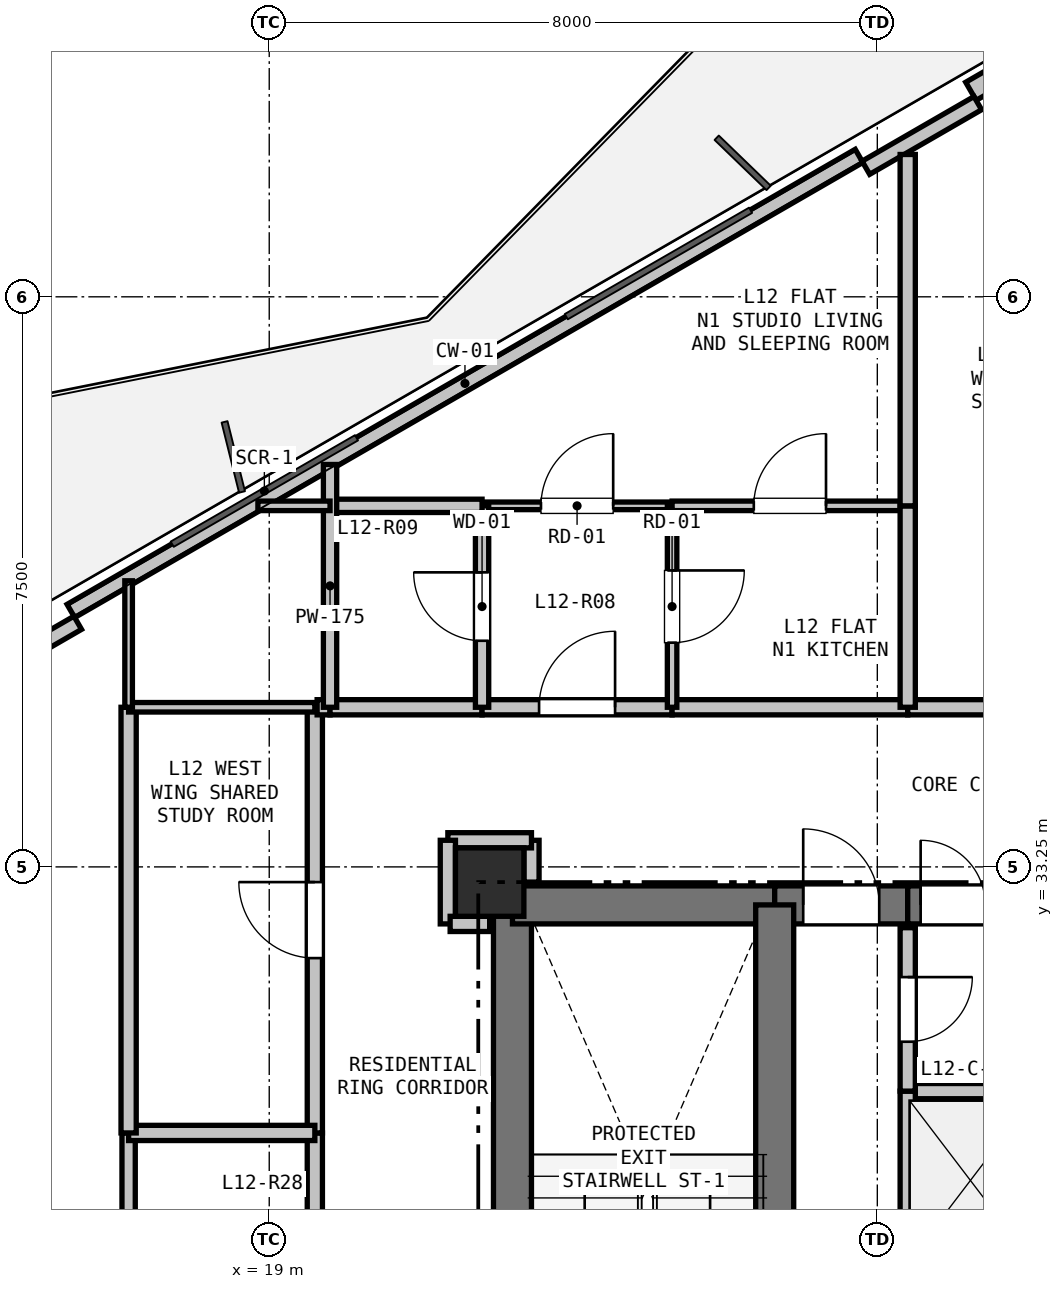
"""IFC4 building model, lengths in metres.
Left out: names, types, materials, properties, quantities, classifications, styles, units other than length and angle.
Written with IfcOpenShell. Run it as: python <this file> out.ifc"""

import sys

from ifc_helpers import new_model, si_unit, direction, frame, frame_2d, origin, origin_2d, place, context, subcontext, project, spatial, rectangle, extrude, element, fill, save


model = new_model("IFC4")
c1 = context("Model", 3, precision=1e-05, world=origin(), true_north=direction((0.0, 1.0)))
c2 = subcontext(c1, "Body", "Model", "MODEL_VIEW")
j1 = project(units=[si_unit("LENGTHUNIT", "METRE"), si_unit("PLANEANGLEUNIT", "RADIAN")], contexts=[c1])
p1 = place(None, origin())
s1 = spatial("IfcSite", under=j1, at=p1, CompositionType="ELEMENT")
p2 = place(p1, origin())
s2 = spatial("IfcBuilding", under=s1, at=p2, CompositionType="ELEMENT")
p3 = place(p2, frame((0.0, 0.0, 45.6)))
s3 = spatial("IfcBuildingStorey", under=s2, at=p3, CompositionType="ELEMENT", Elevation=45.6)
p4 = place(p3, frame((21.9, 33.05, 0.0), z_axis=(0.0, 0.0, 1.0), x_axis=(1.0, 0.0, 0.0)))
e1 = element("IfcColumn", 1, at=p4, inside=s3, PredefinedType="COLUMN", context=c2, shape_type="SweptSolid", body=[
    extrude(rectangle(XDim=0.9, YDim=0.9, at=origin_2d()), origin(), (0.0, 0.0, 1.0), 3.3),
])
p5 = place(p3, frame((16.39, 36.617, 0.0), z_axis=(0.0, 0.0, 1.0), x_axis=(0.866027351828, 0.499996625875, 0.0)))
e2 = element("IfcWall", 2, at=p5, inside=s3, PredefinedType="PARAPET", context=c2, shape_type="SweptSolid", body=[
    extrude(rectangle(XDim=11.973, YDim=0.2, at=frame_2d((5.987, 0.0))), origin(), (0.0, 0.0, 1.0), 0.2),
])
p6 = place(p3, frame((28.232, 43.454, 0.0), z_axis=(0.0, 0.0, 1.0), x_axis=(0.86603192154, 0.499988710747, 0.0)))
e3 = element("IfcWall", 3, at=p6, inside=s3, PredefinedType="SOLIDWALL", context=c2, shape_type="SweptSolid", body=[
    extrude(rectangle(XDim=12.673, YDim=0.275, at=frame_2d((6.336, 0.0))), origin(), (0.0, 0.0, 1.0), 2.66),
])
p7 = place(p6, frame((7.294, 0.0, 0.9)))
e4 = element("IfcOpeningElement", 4, at=p7, cuts=e3, PredefinedType="OPENING", context=c2, shape_type="SweptSolid", body=[
    extrude(rectangle(XDim=1.2, YDim=1.4, at=frame_2d((0.6, 0.7))), frame((0.0, 0.147, 0.0), z_axis=(0.0, -1.0, 0.0), x_axis=(1.0, 0.0, 0.0)), (0.0, 0.0, 1.0), 0.295),
])
for number, where, z_axis, x_axis in (
    (5, (15.008, 35.611, 0.0), (0.0, 0.0, 1.0), (0.866, 0.5, 0.0)),
    (6, (26.85, 42.448, 0.0), (0.0, 0.0, 1.0), (0.866, 0.5, 0.0)),
):
    element("IfcWall", number, at=place(p3, frame(where, z_axis=z_axis, x_axis=x_axis)), inside=s3, PredefinedType="PARAPET", context=c2, shape_type="SweptSolid", body=[
        extrude(rectangle(XDim=1.7, YDim=0.2, at=frame_2d((0.85, 0.0))), origin(), (0.0, 0.0, 1.0), 2.66),
    ])
p8 = place(p3, frame((22.2, 25.4, 0.0), z_axis=(0.0, 0.0, 1.0), x_axis=(0.0, 1.0, 0.0)))
e7 = element("IfcWall", 7, at=p8, inside=s3, PredefinedType="SHEAR", context=c2, shape_type="SweptSolid", body=[
    extrude(rectangle(XDim=7.35, YDim=0.5, at=frame_2d((3.675, 0.0))), origin(), (0.0, 0.0, 1.0), 3.04),
])
p9 = place(p3, frame((22.2, 32.75, 0.0), z_axis=(0.0, 0.0, 1.0), x_axis=(1.0, 0.0, 0.0)))
e8 = element("IfcWall", 8, at=p9, inside=s3, PredefinedType="SHEAR", context=c2, shape_type="SweptSolid", body=[
    extrude(rectangle(XDim=3.45, YDim=0.5, at=frame_2d((1.725, 0.0))), origin(), (0.0, 0.0, 1.0), 3.04),
])
p10 = place(p3, frame((25.65, 32.75, 0.0), z_axis=(0.0, 0.0, 1.0), x_axis=(1.0, 0.0, 0.0)))
e9 = element("IfcWall", 9, at=p10, inside=s3, PredefinedType="SHEAR", context=c2, shape_type="SweptSolid", body=[
    extrude(rectangle(XDim=1.75, YDim=0.5, at=frame_2d((0.875, 0.0))), origin(), (0.0, 0.0, 1.0), 3.04),
])
p11 = place(p10, frame((0.375, 0.0, 0.0)))
e10 = element("IfcOpeningElement", 10, at=p11, cuts=e9, PredefinedType="OPENING", context=c2, shape_type="SweptSolid", body=[
    extrude(rectangle(XDim=1.0, YDim=2.15, at=frame_2d((0.5, 1.075))), frame((0.0, 0.26, 0.0), z_axis=(0.0, -1.0, 0.0), x_axis=(1.0, 0.0, 0.0)), (0.0, 0.0, 1.0), 0.52),
])
p12 = place(p3, frame((27.4, 32.75, 0.0), z_axis=(0.0, 0.0, 1.0), x_axis=(1.0, 0.0, 0.0)))
e11 = element("IfcWall", 11, at=p12, inside=s3, PredefinedType="SHEAR", context=c2, shape_type="SweptSolid", body=[
    extrude(rectangle(XDim=2.25, YDim=0.5, at=frame_2d((1.125, 0.0))), origin(), (0.0, 0.0, 1.0), 3.04),
])
p13 = place(p12, frame((0.17, 0.0, 0.0)))
e12 = element("IfcOpeningElement", 12, at=p13, cuts=e11, PredefinedType="OPENING", context=c2, shape_type="SweptSolid", body=[
    extrude(rectangle(XDim=0.85, YDim=2.1, at=frame_2d((0.425, 1.05))), frame((0.0, 0.26, 0.0), z_axis=(0.0, -1.0, 0.0), x_axis=(1.0, 0.0, 0.0)), (0.0, 0.0, 1.0), 0.52),
])
p14 = place(p12, frame((1.255, 0.0, 0.0)))
e13 = element("IfcOpeningElement", 13, at=p14, cuts=e11, PredefinedType="OPENING", context=c2, shape_type="SweptSolid", body=[
    extrude(rectangle(XDim=0.85, YDim=2.1, at=frame_2d((0.425, 1.05))), frame((0.0, 0.26, 0.0), z_axis=(0.0, -1.0, 0.0), x_axis=(1.0, 0.0, 0.0)), (0.0, 0.0, 1.0), 0.52),
])
p15 = place(p3, frame((25.65, 27.95, 0.0), z_axis=(0.0, 0.0, 1.0), x_axis=(0.0, 1.0, 0.0)))
e14 = element("IfcWall", 14, at=p15, inside=s3, PredefinedType="SHEAR", context=c2, shape_type="SweptSolid", body=[
    extrude(rectangle(XDim=4.8, YDim=0.5, at=frame_2d((2.4, 0.0))), origin(), (0.0, 0.0, 1.0), 3.04),
])
p16 = place(p3, frame((27.4, 30.3, 0.0), z_axis=(0.0, 0.0, 1.0), x_axis=(1.0, 0.0, 0.0)))
e15 = element("IfcWall", 15, at=p16, inside=s3, PredefinedType="PARTITIONING", context=c2, shape_type="SweptSolid", body=[
    extrude(rectangle(XDim=1.15, YDim=0.2, at=frame_2d((0.575, 0.0))), origin(), (0.0, 0.0, 1.0), 3.04),
])
p17 = place(p3, frame((27.4, 28.1, 0.0), z_axis=(0.0, 0.0, 1.0), x_axis=(0.0, 1.0, 0.0)))
e16 = element("IfcWall", 16, at=p17, inside=s3, PredefinedType="PARTITIONING", context=c2, shape_type="SweptSolid", body=[
    extrude(rectangle(XDim=2.2, YDim=0.2, at=frame_2d((1.1, 0.0))), origin(), (0.0, 0.0, 1.0), 3.04),
])
p18 = place(p3, frame((27.4, 32.45, 0.0), z_axis=(0.0, 0.0, 1.0), x_axis=(0.0, -1.0, 0.0)))
e17 = element("IfcWall", 17, at=p18, inside=s3, PredefinedType="PARTITIONING", context=c2, shape_type="SweptSolid", body=[
    extrude(rectangle(XDim=2.15, YDim=0.2, at=frame_2d((1.075, 0.0))), origin(), (0.0, 0.0, 1.0), 3.04),
])
p19 = place(p18, frame((0.65, 0.0, 0.0)))
e18 = element("IfcOpeningElement", 18, at=p19, cuts=e17, PredefinedType="OPENING", context=c2, shape_type="SweptSolid", body=[
    extrude(rectangle(XDim=0.85, YDim=2.1, at=frame_2d((0.425, 1.05))), frame((0.0, 0.11, 0.0), z_axis=(0.0, -1.0, 0.0), x_axis=(1.0, 0.0, 0.0)), (0.0, 0.0, 1.0), 0.22),
])
p20 = place(p3, frame((19.6, 27.65, 0.0), z_axis=(0.0, 0.0, 1.0), x_axis=(0.0, 1.0, 0.0)))
e19 = element("IfcWall", 19, at=p20, inside=s3, PredefinedType="PARTITIONING", context=c2, shape_type="SweptSolid", body=[
    extrude(rectangle(XDim=2.1, YDim=0.2, at=frame_2d((1.05, 0.0))), origin(), (0.0, 0.0, 1.0), 3.04),
])
p21 = place(p3, frame((19.6, 29.75, 0.0), z_axis=(0.0, 0.0, 1.0), x_axis=(0.0, 1.0, 0.0)))
e20 = element("IfcWall", 20, at=p21, inside=s3, PredefinedType="PARTITIONING", context=c2, shape_type="SweptSolid", body=[
    extrude(rectangle(XDim=5.6, YDim=0.2, at=frame_2d((2.8, 0.0))), origin(), (0.0, 0.0, 1.0), 2.337),
])
p22 = place(p21, frame((2.3, 0.0, 0.0)))
e21 = element("IfcOpeningElement", 21, at=p22, cuts=e20, PredefinedType="OPENING", context=c2, shape_type="SweptSolid", body=[
    extrude(rectangle(XDim=1.0, YDim=2.15, at=frame_2d((0.5, 1.075))), frame((0.0, 0.11, 0.0), z_axis=(0.0, -1.0, 0.0), x_axis=(1.0, 0.0, 0.0)), (0.0, 0.0, 1.0), 0.22),
])
p23 = place(p3, frame((19.63, 35.35, 0.0), z_axis=(0.0, 0.0, 1.0), x_axis=(1.0, 0.0, 0.0)))
e22 = element("IfcWall", 22, at=p23, inside=s3, PredefinedType="PARTITIONING", context=c2, shape_type="SweptSolid", body=[
    extrude(rectangle(XDim=0.17, YDim=0.2, at=frame_2d((0.085, 0.0))), origin(), (0.0, 0.0, 1.0), 3.04),
])
p24 = place(p3, frame((19.8, 35.35, 0.0), z_axis=(0.0, 0.0, 1.0), x_axis=(1.0, 0.0, 0.0)))
e23 = element("IfcWall", 23, at=p24, inside=s3, PredefinedType="PARTITIONING", context=c2, shape_type="SweptSolid", body=[
    extrude(rectangle(XDim=2.0, YDim=0.2, at=frame_2d((1.0, 0.0))), origin(), (0.0, 0.0, 1.0), 3.04),
])
p25 = place(p3, frame((21.8, 35.35, 0.0), z_axis=(0.0, 0.0, 1.0), x_axis=(1.0, 0.0, 0.0)))
e24 = element("IfcWall", 24, at=p25, inside=s3, PredefinedType="PARTITIONING", context=c2, shape_type="SweptSolid", body=[
    extrude(rectangle(XDim=2.5, YDim=0.2, at=frame_2d((1.25, 0.0))), origin(), (0.0, 0.0, 1.0), 3.04),
])
p26 = place(p25, frame((0.75, 0.0, 0.0)))
e25 = element("IfcOpeningElement", 25, at=p26, cuts=e24, PredefinedType="OPENING", context=c2, shape_type="SweptSolid", body=[
    extrude(rectangle(XDim=1.0, YDim=2.15, at=frame_2d((0.5, 1.075))), frame((0.0, 0.11, 0.0), z_axis=(0.0, -1.0, 0.0), x_axis=(1.0, 0.0, 0.0)), (0.0, 0.0, 1.0), 0.22),
])
p27 = place(p3, frame((24.3, 35.35, 0.0), z_axis=(0.0, 0.0, 1.0), x_axis=(1.0, 0.0, 0.0)))
e26 = element("IfcWall", 26, at=p27, inside=s3, PredefinedType="PARTITIONING", context=c2, shape_type="SweptSolid", body=[
    extrude(rectangle(XDim=3.1, YDim=0.2, at=frame_2d((1.55, 0.0))), origin(), (0.0, 0.0, 1.0), 3.04),
])
p28 = place(p3, frame((27.4, 35.35, 0.0), z_axis=(0.0, 0.0, 1.0), x_axis=(1.0, 0.0, 0.0)))
e27 = element("IfcWall", 27, at=p28, inside=s3, PredefinedType="PARTITIONING", context=c2, shape_type="SweptSolid", body=[
    extrude(rectangle(XDim=3.2, YDim=0.2, at=frame_2d((1.6, 0.0))), origin(), (0.0, 0.0, 1.0), 3.04),
])
p29 = place(p28, frame((1.1, 0.0, 0.0)))
e28 = element("IfcOpeningElement", 28, at=p29, cuts=e27, PredefinedType="OPENING", context=c2, shape_type="SweptSolid", body=[
    extrude(rectangle(XDim=1.0, YDim=2.15, at=frame_2d((0.5, 1.075))), frame((0.0, 0.11, 0.0), z_axis=(0.0, -1.0, 0.0), x_axis=(1.0, 0.0, 0.0)), (0.0, 0.0, 1.0), 0.22),
])
p30 = place(p3, frame((22.45, 33.05, 0.0), z_axis=(0.0, 0.0, 1.0), x_axis=(0.0, 1.0, 0.0)))
e29 = element("IfcWall", 29, at=p30, inside=s3, PredefinedType="PARTITIONING", context=c2, shape_type="SweptSolid", body=[
    extrude(rectangle(XDim=0.55, YDim=0.2, at=frame_2d((0.275, 0.0))), origin(), (0.0, 0.0, 1.0), 2.488),
])
p31 = place(p3, frame((22.45, 33.6, 0.0), z_axis=(0.0, 0.0, 1.0), x_axis=(-1.0, 0.0, 0.0)))
e30 = element("IfcWall", 30, at=p31, inside=s3, PredefinedType="PARTITIONING", context=c2, shape_type="SweptSolid", body=[
    extrude(rectangle(XDim=1.1, YDim=0.2, at=frame_2d((0.55, 0.0))), origin(), (0.0, 0.0, 1.0), 3.04),
])
p32 = place(p3, frame((21.35, 33.6, 0.0), z_axis=(0.0, 0.0, 1.0), x_axis=(0.0, -1.0, 0.0)))
e31 = element("IfcWall", 31, at=p32, inside=s3, PredefinedType="PARTITIONING", context=c2, shape_type="SweptSolid", body=[
    extrude(rectangle(XDim=1.1, YDim=0.2, at=frame_2d((0.55, 0.0))), origin(), (0.0, 0.0, 1.0), 2.337),
])
p33 = place(p3, frame((21.38, 32.5, 0.0), z_axis=(0.0, 0.0, 1.0), x_axis=(1.0, 0.0, 0.0)))
e32 = element("IfcWall", 32, at=p33, inside=s3, PredefinedType="PARTITIONING", context=c2, shape_type="SweptSolid", body=[
    extrude(rectangle(XDim=0.52, YDim=0.2, at=frame_2d((0.26, 0.0))), origin(), (0.0, 0.0, 1.0), 2.488),
])
p34 = place(p3, frame((21.8, 38.0, 0.0), z_axis=(0.0, 0.0, 1.0), x_axis=(1.0, 0.0, 0.0)))
e33 = element("IfcWall", 33, at=p34, inside=s3, PredefinedType="PARTITIONING", context=c2, shape_type="SweptSolid", body=[
    extrude(rectangle(XDim=2.5, YDim=0.1, at=frame_2d((1.25, 0.0))), origin(), (0.0, 0.0, 1.0), 3.04),
])
p35 = place(p34, frame((0.775, 0.0, 0.0)))
e34 = element("IfcOpeningElement", 34, at=p35, cuts=e33, PredefinedType="OPENING", context=c2, shape_type="SweptSolid", body=[
    extrude(rectangle(XDim=0.95, YDim=2.1, at=frame_2d((0.475, 1.05))), frame((0.0, 0.06, 0.0), z_axis=(0.0, -1.0, 0.0), x_axis=(1.0, 0.0, 0.0)), (0.0, 0.0, 1.0), 0.12),
])
p36 = place(p3, frame((24.3, 38.0, 0.0), z_axis=(0.0, 0.0, 1.0), x_axis=(0.0, -1.0, 0.0)))
e35 = element("IfcWall", 35, at=p36, inside=s3, PredefinedType="PARTITIONING", context=c2, shape_type="SweptSolid", body=[
    extrude(rectangle(XDim=2.65, YDim=0.125, at=frame_2d((1.325, 0.0))), origin(), (0.0, 0.0, 1.0), 3.04),
])
p37 = place(p36, frame((0.85, 0.0, 0.0)))
e36 = element("IfcOpeningElement", 36, at=p37, cuts=e35, PredefinedType="OPENING", context=c2, shape_type="SweptSolid", body=[
    extrude(rectangle(XDim=0.95, YDim=2.1, at=frame_2d((0.475, 1.05))), frame((0.0, 0.073, 0.0), z_axis=(0.0, -1.0, 0.0), x_axis=(1.0, 0.0, 0.0)), (0.0, 0.0, 1.0), 0.145),
])
p38 = place(p3, frame((21.8, 35.35, 0.0), z_axis=(0.0, 0.0, 1.0), x_axis=(0.0, 1.0, 0.0)))
e37 = element("IfcWall", 37, at=p38, inside=s3, PredefinedType="PLUMBINGWALL", context=c2, shape_type="SweptSolid", body=[
    extrude(rectangle(XDim=2.65, YDim=0.175, at=frame_2d((1.325, 0.0))), origin(), (0.0, 0.0, 1.0), 3.04),
])
p39 = place(p38, frame((0.875, 0.0, 0.0)))
e38 = element("IfcOpeningElement", 38, at=p39, cuts=e37, PredefinedType="OPENING", context=c2, shape_type="SweptSolid", body=[
    extrude(rectangle(XDim=0.9, YDim=2.1, at=frame_2d((0.45, 1.05))), frame((0.0, 0.097, 0.0), z_axis=(0.0, -1.0, 0.0), x_axis=(1.0, 0.0, 0.0)), (0.0, 0.0, 1.0), 0.195),
])
p40 = place(p3, frame((19.8, 38.0, 0.0), z_axis=(0.0, 0.0, 1.0), x_axis=(1.0, 0.0, 0.0)))
e39 = element("IfcWall", 39, at=p40, inside=s3, PredefinedType="PLUMBINGWALL", context=c2, shape_type="SweptSolid", body=[
    extrude(rectangle(XDim=2.0, YDim=0.175, at=frame_2d((1.0, 0.0))), origin(), (0.0, 0.0, 1.0), 2.365),
])
p41 = place(p3, frame((19.8, 35.35, 0.0), z_axis=(0.0, 0.0, 1.0), x_axis=(0.0, 1.0, 0.0)))
e40 = element("IfcWall", 40, at=p41, inside=s3, PredefinedType="PLUMBINGWALL", context=c2, shape_type="SweptSolid", body=[
    extrude(rectangle(XDim=3.194, YDim=0.175, at=frame_2d((1.597, 0.0))), origin(), (0.0, 0.0, 1.0), 2.365),
])
p42 = place(p3, frame((24.3, 38.0, 0.0), z_axis=(0.0, 0.0, 1.0), x_axis=(1.0, 0.0, 0.0)))
e41 = element("IfcWall", 41, at=p42, inside=s3, PredefinedType="PARTITIONING", context=c2, shape_type="SweptSolid", body=[
    extrude(rectangle(XDim=3.1, YDim=0.125, at=frame_2d((1.55, 0.0))), origin(), (0.0, 0.0, 1.0), 3.04),
])
p43 = place(p42, frame((1.075, 0.0, 0.0)))
e42 = element("IfcOpeningElement", 42, at=p43, cuts=e41, PredefinedType="OPENING", context=c2, shape_type="SweptSolid", body=[
    extrude(rectangle(XDim=0.95, YDim=2.1, at=frame_2d((0.475, 1.05))), frame((0.0, 0.073, 0.0), z_axis=(0.0, -1.0, 0.0), x_axis=(1.0, 0.0, 0.0)), (0.0, 0.0, 1.0), 0.145),
])
p44 = place(p3, frame((27.4, 38.0, 0.0), z_axis=(0.0, 0.0, 1.0), x_axis=(0.0, -1.0, 0.0)))
e43 = element("IfcWall", 43, at=p44, inside=s3, PredefinedType="PARTITIONING", context=c2, shape_type="SweptSolid", body=[
    extrude(rectangle(XDim=2.65, YDim=0.2, at=frame_2d((1.325, 0.0))), origin(), (0.0, 0.0, 1.0), 3.04),
])
p45 = place(p3, frame((17.15, 27.65, 0.0), z_axis=(0.0, 0.0, 1.0), x_axis=(0.0, 1.0, 0.0)))
e44 = element("IfcWall", 44, at=p45, inside=s3, PredefinedType="PLUMBINGWALL", context=c2, shape_type="SweptSolid", body=[
    extrude(rectangle(XDim=2.1, YDim=0.175, at=frame_2d((1.05, 0.0))), origin(), (0.0, 0.0, 1.0), 3.04),
])
p46 = place(p3, frame((17.15, 29.75, 0.0), z_axis=(0.0, 0.0, 1.0), x_axis=(1.0, 0.0, 0.0)))
e45 = element("IfcWall", 45, at=p46, inside=s3, PredefinedType="PARTITIONING", context=c2, shape_type="SweptSolid", body=[
    extrude(rectangle(XDim=2.45, YDim=0.2, at=frame_2d((1.225, 0.0))), origin(), (0.0, 0.0, 1.0), 3.04),
])
p47 = place(p3, frame((27.4, 38.0, 0.0), z_axis=(0.0, 0.0, 1.0), x_axis=(0.0, 1.0, 0.0)))
e46 = element("IfcWall", 46, at=p47, inside=s3, PredefinedType="PARTITIONING", context=c2, shape_type="SweptSolid", body=[
    extrude(rectangle(XDim=4.623, YDim=0.2, at=frame_2d((2.311, 0.0))), origin(), (0.0, 0.0, 1.0), 2.365),
])
p48 = place(p3, frame((17.15, 29.75, 0.0), z_axis=(0.0, 0.0, 1.0), x_axis=(0.0, 1.0, 0.0)))
e47 = element("IfcWall", 47, at=p48, inside=s3, PredefinedType="PARTITIONING", context=c2, shape_type="SweptSolid", body=[
    extrude(rectangle(XDim=5.6, YDim=0.2, at=frame_2d((2.8, 0.0))), origin(), (0.0, 0.0, 1.0), 2.337),
])
p49 = place(p3, frame((17.15, 35.35, 0.0), z_axis=(0.0, 0.0, 1.0), x_axis=(1.0, 0.0, 0.0)))
e48 = element("IfcWall", 48, at=p49, inside=s3, PredefinedType="PARTITIONING", context=c2, shape_type="SweptSolid", body=[
    extrude(rectangle(XDim=2.45, YDim=0.125, at=frame_2d((1.225, 0.0))), origin(), (0.0, 0.0, 1.0), 3.04),
])
p50 = place(p3, frame((19.8, 38.0, 0.0), z_axis=(0.0, 0.0, 1.0), x_axis=(-1.0, 0.0, 0.0)))
e49 = element("IfcWall", 49, at=p50, inside=s3, PredefinedType="PARTITIONING", context=c2, shape_type="SweptSolid", body=[
    extrude(rectangle(XDim=0.949, YDim=0.125, at=frame_2d((0.475, 0.0))), origin(), (0.0, 0.0, 1.0), 2.365),
])
p51 = place(p3, frame((17.15, 37.014, 0.0), z_axis=(0.0, 0.0, 1.0), x_axis=(0.0, -1.0, 0.0)))
e50 = element("IfcWall", 50, at=p51, inside=s3, PredefinedType="PARTITIONING", context=c2, shape_type="SweptSolid", body=[
    extrude(rectangle(XDim=1.664, YDim=0.1, at=frame_2d((0.832, 0.0))), origin(), (0.0, 0.0, 1.0), 2.365),
])
p52 = place(p11, origin())
e51 = element("IfcDoor", 51, at=p52, inside=s3, OperationType="SINGLE_SWING_LEFT", PredefinedType="DOOR", context=c2, shape_type="SweptSolid", body=[
    extrude(rectangle(XDim=1.0, YDim=2.15, at=frame_2d((0.5, 1.075))), frame((0.0, 0.025, 0.0), z_axis=(0.0, -1.0, 0.0), x_axis=(1.0, 0.0, 0.0)), (0.0, 0.0, 1.0), 0.05),
])
fill(e10, e51)
p53 = place(p19, origin())
e52 = element("IfcDoor", 52, at=p53, inside=s3, OperationType="SINGLE_SWING_LEFT", PredefinedType="DOOR", context=c2, shape_type="SweptSolid", body=[
    extrude(rectangle(XDim=0.85, YDim=2.1, at=frame_2d((0.425, 1.05))), frame((0.0, 0.025, 0.0), z_axis=(0.0, -1.0, 0.0), x_axis=(1.0, 0.0, 0.0)), (0.0, 0.0, 1.0), 0.05),
])
fill(e18, e52)
p54 = place(p26, origin())
e53 = element("IfcDoor", 53, at=p54, inside=s3, OperationType="SINGLE_SWING_RIGHT", PredefinedType="DOOR", context=c2, shape_type="SweptSolid", body=[
    extrude(rectangle(XDim=1.0, YDim=2.15, at=frame_2d((0.5, 1.075))), frame((0.0, 0.025, 0.0), z_axis=(0.0, -1.0, 0.0), x_axis=(1.0, 0.0, 0.0)), (0.0, 0.0, 1.0), 0.05),
])
fill(e25, e53)
p55 = place(p13, origin())
e54 = element("IfcDoor", 54, at=p55, inside=s3, OperationType="SINGLE_SWING_LEFT", PredefinedType="DOOR", context=c2, shape_type="SweptSolid", body=[
    extrude(rectangle(XDim=0.85, YDim=2.1, at=frame_2d((0.425, 1.05))), frame((0.0, 0.025, 0.0), z_axis=(0.0, -1.0, 0.0), x_axis=(1.0, 0.0, 0.0)), (0.0, 0.0, 1.0), 0.05),
])
fill(e12, e54)
p56 = place(p22, origin())
e55 = element("IfcDoor", 55, at=p56, inside=s3, OperationType="SINGLE_SWING_RIGHT", PredefinedType="DOOR", context=c2, shape_type="SweptSolid", body=[
    extrude(rectangle(XDim=1.0, YDim=2.15, at=frame_2d((0.5, 1.075))), frame((0.0, 0.025, 0.0), z_axis=(0.0, -1.0, 0.0), x_axis=(1.0, 0.0, 0.0)), (0.0, 0.0, 1.0), 0.05),
])
fill(e21, e55)
p57 = place(p39, origin())
e56 = element("IfcDoor", 56, at=p57, inside=s3, OperationType="SINGLE_SWING_RIGHT", PredefinedType="DOOR", context=c2, shape_type="SweptSolid", body=[
    extrude(rectangle(XDim=0.9, YDim=2.1, at=frame_2d((0.45, 1.05))), frame((0.0, 0.025, 0.0), z_axis=(0.0, -1.0, 0.0), x_axis=(1.0, 0.0, 0.0)), (0.0, 0.0, 1.0), 0.05),
])
fill(e38, e56)
p58 = place(p37, origin())
e57 = element("IfcDoor", 57, at=p58, inside=s3, OperationType="SINGLE_SWING_LEFT", PredefinedType="DOOR", context=c2, shape_type="SweptSolid", body=[
    extrude(rectangle(XDim=0.95, YDim=2.1, at=frame_2d((0.475, 1.05))), frame((0.0, 0.025, 0.0), z_axis=(0.0, -1.0, 0.0), x_axis=(1.0, 0.0, 0.0)), (0.0, 0.0, 1.0), 0.05),
])
fill(e36, e57)
p59 = place(p35, origin())
e58 = element("IfcDoor", 58, at=p59, inside=s3, OperationType="SINGLE_SWING_RIGHT", PredefinedType="DOOR", context=c2, shape_type="SweptSolid", body=[
    extrude(rectangle(XDim=0.95, YDim=2.1, at=frame_2d((0.475, 1.05))), frame((0.0, 0.025, 0.0), z_axis=(0.0, -1.0, 0.0), x_axis=(1.0, 0.0, 0.0)), (0.0, 0.0, 1.0), 0.05),
])
fill(e34, e58)
p60 = place(p43, origin())
e59 = element("IfcDoor", 59, at=p60, inside=s3, OperationType="SINGLE_SWING_RIGHT", PredefinedType="DOOR", context=c2, shape_type="SweptSolid", body=[
    extrude(rectangle(XDim=0.95, YDim=2.1, at=frame_2d((0.475, 1.05))), frame((0.0, 0.025, 0.0), z_axis=(0.0, -1.0, 0.0), x_axis=(1.0, 0.0, 0.0)), (0.0, 0.0, 1.0), 0.05),
])
fill(e42, e59)
save(model, sys.argv[1])
